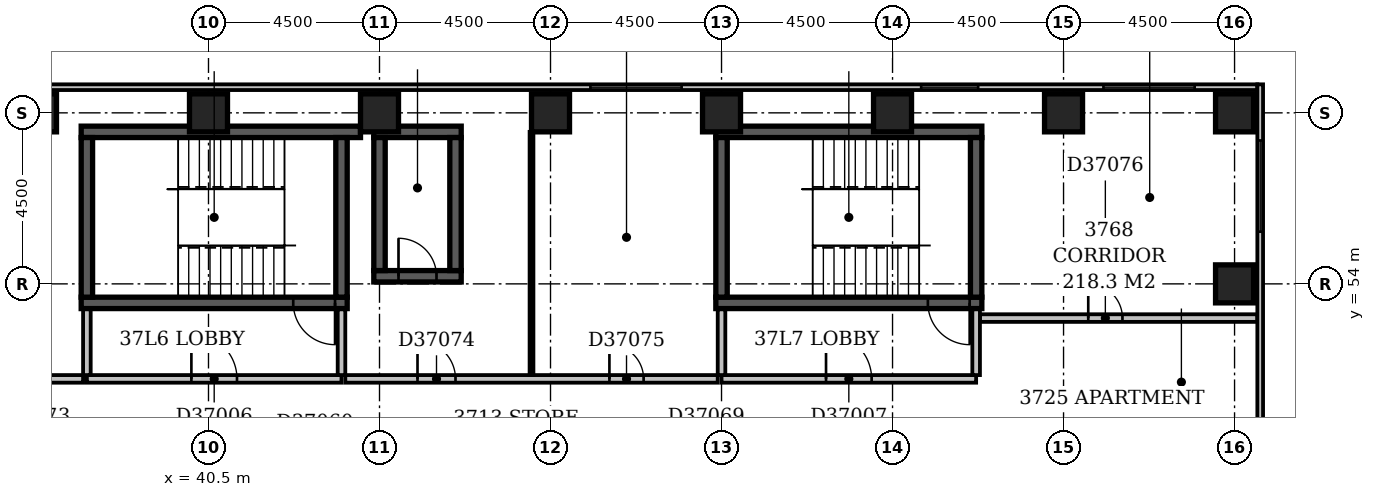
"""IFC4 building model, lengths in metres.
Left out: names, types, materials, properties, quantities, classifications, styles, units other than length and angle.
Written with IfcOpenShell. Run it as: python <this file> out.ifc"""

import sys

from ifc_helpers import new_model, si_unit, direction, frame, frame_2d, origin, origin_2d, place, context, subcontext, project, spatial, rectangle, extrude, element, fill, save


model = new_model("IFC4")
c1 = context("Model", 3, precision=1e-05, world=origin(), true_north=direction((0.0, 1.0)))
c2 = subcontext(c1, "Body", "Model", "MODEL_VIEW")
j1 = project(units=[si_unit("LENGTHUNIT", "METRE"), si_unit("PLANEANGLEUNIT", "RADIAN")], contexts=[c1])
p1 = place(None, origin())
s1 = spatial("IfcSite", under=j1, at=p1, CompositionType="ELEMENT")
p2 = place(p1, origin())
s2 = spatial("IfcBuilding", under=s1, at=p2, CompositionType="ELEMENT")
p3 = place(p2, frame((0.0, 0.0, 148.4)))
s3 = spatial("IfcBuildingStorey", under=s2, at=p3, CompositionType="ELEMENT", Elevation=148.4)
p4 = place(p3, frame((37.15, 53.5, -0.3), z_axis=(0.0, 0.0, 1.0), x_axis=(1.0, 0.0, 0.0)))
e1 = element("IfcWall", 1, at=p4, inside=s3, PredefinedType="SHEAR", context=c2, shape_type="SweptSolid", body=[
    extrude(rectangle(XDim=7.0, YDim=0.3, at=frame_2d((3.5, 0.0))), origin(), (0.0, 0.0, 1.0), 3.6),
])
p5 = place(p4, frame((5.58, 0.0, 0.3)))
e2 = element("IfcOpeningElement", 2, at=p5, cuts=e1, PredefinedType="OPENING", context=c2, shape_type="SweptSolid", body=[
    extrude(rectangle(XDim=1.1, YDim=2.1, at=frame_2d((0.55, 1.05))), frame((0.0, 0.162, 0.0), z_axis=(0.0, -1.0, 0.0), x_axis=(1.0, 0.0, 0.0)), (0.0, 0.0, 1.0), 0.324),
])
p6 = place(p3, frame((37.15, 58.0, -0.3), z_axis=(0.0, 0.0, 1.0), x_axis=(1.0, 0.0, 0.0)))
e3 = element("IfcWall", 3, at=p6, inside=s3, PredefinedType="SHEAR", context=c2, shape_type="SweptSolid", body=[
    extrude(rectangle(XDim=7.35, YDim=0.3, at=frame_2d((3.675, 0.0))), origin(), (0.0, 0.0, 1.0), 3.6),
])
for number, where, z_axis, x_axis in (
    (4, (37.3, 53.65, -0.3), (0.0, 0.0, 1.0), (0.0, 1.0, 0.0)),
    (5, (44.0, 53.65, -0.3), (0.0, 0.0, 1.0), (0.0, 1.0, 0.0)),
):
    element("IfcWall", number, at=place(p3, frame(where, z_axis=z_axis, x_axis=x_axis)), inside=s3, PredefinedType="SHEAR", context=c2, shape_type="SweptSolid", body=[
        extrude(rectangle(XDim=4.2, YDim=0.3, at=frame_2d((2.1, 0.0))), origin(), (0.0, 0.0, 1.0), 3.6),
    ])
p7 = place(p3, frame((44.85, 54.2, -0.3), z_axis=(0.0, 0.0, 1.0), x_axis=(1.0, 0.0, 0.0)))
e6 = element("IfcWall", 6, at=p7, inside=s3, PredefinedType="SHEAR", context=c2, shape_type="SweptSolid", body=[
    extrude(rectangle(XDim=2.3, YDim=0.3, at=frame_2d((1.15, 0.0))), origin(), (0.0, 0.0, 1.0), 3.6),
])
p8 = place(p7, frame((0.65, 0.0, 0.3)))
e7 = element("IfcOpeningElement", 7, at=p8, cuts=e6, PredefinedType="OPENING", context=c2, shape_type="SweptSolid", body=[
    extrude(rectangle(XDim=1.0, YDim=2.1, at=frame_2d((0.5, 1.05))), frame((0.0, 0.162, 0.0), z_axis=(0.0, -1.0, 0.0), x_axis=(1.0, 0.0, 0.0)), (0.0, 0.0, 1.0), 0.324),
])
p9 = place(p3, frame((44.85, 58.0, -0.3), z_axis=(0.0, 0.0, 1.0), x_axis=(1.0, 0.0, 0.0)))
e8 = element("IfcWall", 8, at=p9, inside=s3, PredefinedType="SHEAR", context=c2, shape_type="SweptSolid", body=[
    extrude(rectangle(XDim=2.3, YDim=0.3, at=frame_2d((1.15, 0.0))), origin(), (0.0, 0.0, 1.0), 3.6),
])
for number, where, z_axis, x_axis in (
    (9, (45.0, 54.35, -0.3), (0.0, 0.0, 1.0), (0.0, 1.0, 0.0)),
    (10, (47.0, 54.35, -0.3), (0.0, 0.0, 1.0), (0.0, 1.0, 0.0)),
):
    element("IfcWall", number, at=place(p3, frame(where, z_axis=z_axis, x_axis=x_axis)), inside=s3, PredefinedType="SHEAR", context=c2, shape_type="SweptSolid", body=[
        extrude(rectangle(XDim=3.5, YDim=0.3, at=frame_2d((1.75, 0.0))), origin(), (0.0, 0.0, 1.0), 3.6),
    ])
p10 = place(p3, frame((53.85, 53.5, -0.3), z_axis=(0.0, 0.0, 1.0), x_axis=(1.0, 0.0, 0.0)))
e11 = element("IfcWall", 11, at=p10, inside=s3, PredefinedType="SHEAR", context=c2, shape_type="SweptSolid", body=[
    extrude(rectangle(XDim=7.0, YDim=0.3, at=frame_2d((3.5, 0.0))), origin(), (0.0, 0.0, 1.0), 3.6),
])
p11 = place(p10, frame((5.58, 0.0, 0.3)))
e12 = element("IfcOpeningElement", 12, at=p11, cuts=e11, PredefinedType="OPENING", context=c2, shape_type="SweptSolid", body=[
    extrude(rectangle(XDim=1.1, YDim=2.1, at=frame_2d((0.55, 1.05))), frame((0.0, 0.162, 0.0), z_axis=(0.0, -1.0, 0.0), x_axis=(1.0, 0.0, 0.0)), (0.0, 0.0, 1.0), 0.324),
])
p12 = place(p3, frame((53.85, 58.0, -0.3), z_axis=(0.0, 0.0, 1.0), x_axis=(1.0, 0.0, 0.0)))
e13 = element("IfcWall", 13, at=p12, inside=s3, PredefinedType="SHEAR", context=c2, shape_type="SweptSolid", body=[
    extrude(rectangle(XDim=7.0, YDim=0.3, at=frame_2d((3.5, 0.0))), origin(), (0.0, 0.0, 1.0), 3.6),
])
for number, where, z_axis, x_axis in (
    (14, (54.0, 53.65, -0.3), (0.0, 0.0, 1.0), (0.0, 1.0, 0.0)),
    (15, (60.7, 53.65, -0.3), (0.0, 0.0, 1.0), (0.0, 1.0, 0.0)),
):
    element("IfcWall", number, at=place(p3, frame(where, z_axis=z_axis, x_axis=x_axis)), inside=s3, PredefinedType="SHEAR", context=c2, shape_type="SweptSolid", body=[
        extrude(rectangle(XDim=4.2, YDim=0.3, at=frame_2d((2.1, 0.0))), origin(), (0.0, 0.0, 1.0), 3.6),
    ])
for number, where, z_axis, x_axis in (
    (16, (67.5, 54.0, -0.3), (0.0, 0.0, 1.0), (1.0, 0.0, 0.0)),
    (17, (36.0, 58.5, -0.3), (0.0, 0.0, 1.0), (1.0, 0.0, 0.0)),
    (18, (40.5, 58.5, -0.3), (0.0, 0.0, 1.0), (1.0, 0.0, 0.0)),
    (19, (45.0, 58.5, -0.3), (0.0, 0.0, 1.0), (1.0, 0.0, 0.0)),
    (20, (49.5, 58.5, -0.3), (0.0, 0.0, 1.0), (1.0, 0.0, 0.0)),
    (21, (54.0, 58.5, -0.3), (0.0, 0.0, 1.0), (1.0, 0.0, 0.0)),
    (22, (58.5, 58.5, -0.3), (0.0, 0.0, 1.0), (1.0, 0.0, 0.0)),
    (23, (63.0, 58.5, -0.3), (0.0, 0.0, 1.0), (1.0, 0.0, 0.0)),
    (24, (67.5, 58.5, -0.3), (0.0, 0.0, 1.0), (1.0, 0.0, 0.0)),
):
    element("IfcColumn", number, at=place(p3, frame(where, z_axis=z_axis, x_axis=x_axis)), inside=s3, PredefinedType="COLUMN", context=c2, shape_type="SweptSolid", body=[
        extrude(rectangle(XDim=1.0, YDim=1.0, at=origin_2d()), origin(), (0.0, 0.0, 1.0), 3.6),
    ])
p13 = place(p3, frame((68.175, 35.4, 0.0), z_axis=(0.0, 0.0, 1.0), x_axis=(0.0, 1.0, 0.0)))
e25 = element("IfcWall", 25, at=p13, inside=s3, PredefinedType="STANDARD", context=c2, shape_type="SweptSolid", body=[
    extrude(rectangle(XDim=23.85, YDim=0.15, at=frame_2d((11.925, 0.0))), origin(), (0.0, 0.0, 1.0), 2.7),
])
p14 = place(p13, frame((1.65, 0.0, 0.6)))
e26 = element("IfcOpeningElement", 26, at=p14, cuts=e25, PredefinedType="OPENING", context=c2, shape_type="SweptSolid", body=[
    extrude(rectangle(XDim=2.4, YDim=1.8, at=frame_2d((1.2, 0.9))), frame((0.0, 0.087, 0.0), z_axis=(0.0, -1.0, 0.0), x_axis=(1.0, 0.0, 0.0)), (0.0, 0.0, 1.0), 0.174),
])
p15 = place(p13, frame((10.65, 0.0, 0.6)))
e27 = element("IfcOpeningElement", 27, at=p15, cuts=e25, PredefinedType="OPENING", context=c2, shape_type="SweptSolid", body=[
    extrude(rectangle(XDim=2.4, YDim=1.8, at=frame_2d((1.2, 0.9))), frame((0.0, 0.087, 0.0), z_axis=(0.0, -1.0, 0.0), x_axis=(1.0, 0.0, 0.0)), (0.0, 0.0, 1.0), 0.174),
])
p16 = place(p13, frame((19.973, 0.0, 0.6)))
e28 = element("IfcOpeningElement", 28, at=p16, cuts=e25, PredefinedType="OPENING", context=c2, shape_type="SweptSolid", body=[
    extrude(rectangle(XDim=2.4, YDim=1.8, at=frame_2d((1.2, 0.9))), frame((0.0, 0.087, 0.0), z_axis=(0.0, -1.0, 0.0), x_axis=(1.0, 0.0, 0.0)), (0.0, 0.0, 1.0), 0.174),
])
p17 = place(p3, frame((68.1, 59.175, 0.0), z_axis=(0.0, 0.0, 1.0), x_axis=(-1.0, 0.0, 0.0)))
e29 = element("IfcWall", 29, at=p17, inside=s3, PredefinedType="STANDARD", context=c2, shape_type="SweptSolid", body=[
    extrude(rectangle(XDim=68.85, YDim=0.15, at=frame_2d((34.425, 0.0))), origin(), (0.0, 0.0, 1.0), 2.7),
])
p18 = place(p17, frame((1.65, 0.0, 0.6)))
e30 = element("IfcOpeningElement", 30, at=p18, cuts=e29, PredefinedType="OPENING", context=c2, shape_type="SweptSolid", body=[
    extrude(rectangle(XDim=2.4, YDim=1.8, at=frame_2d((1.2, 0.9))), frame((0.0, 0.087, 0.0), z_axis=(0.0, -1.0, 0.0), x_axis=(1.0, 0.0, 0.0)), (0.0, 0.0, 1.0), 0.174),
])
p19 = place(p17, frame((7.347, 0.0, 0.6)))
e31 = element("IfcOpeningElement", 31, at=p19, cuts=e29, PredefinedType="OPENING", context=c2, shape_type="SweptSolid", body=[
    extrude(rectangle(XDim=1.5, YDim=1.8, at=frame_2d((0.75, 0.9))), frame((0.0, 0.087, 0.0), z_axis=(0.0, -1.0, 0.0), x_axis=(1.0, 0.0, 0.0)), (0.0, 0.0, 1.0), 0.174),
])
p20 = place(p17, frame((15.15, 0.0, 0.6)))
e32 = element("IfcOpeningElement", 32, at=p20, cuts=e29, PredefinedType="OPENING", context=c2, shape_type="SweptSolid", body=[
    extrude(rectangle(XDim=2.4, YDim=1.8, at=frame_2d((1.2, 0.9))), frame((0.0, 0.087, 0.0), z_axis=(0.0, -1.0, 0.0), x_axis=(1.0, 0.0, 0.0)), (0.0, 0.0, 1.0), 0.174),
])
p21 = place(p3, frame((37.3, 51.5, 0.0), z_axis=(0.0, 0.0, 1.0), x_axis=(1.0, 0.0, 0.0)))
e33 = element("IfcWall", 33, at=p21, inside=s3, PredefinedType="PARTITIONING", context=c2, shape_type="SweptSolid", body=[
    extrude(rectangle(XDim=6.7, YDim=0.2, at=frame_2d((3.35, 0.0))), origin(), (0.0, 0.0, 1.0), 3.3),
])
p22 = place(p21, frame((2.75, 0.0, 0.0)))
e34 = element("IfcOpeningElement", 34, at=p22, cuts=e33, PredefinedType="OPENING", context=c2, shape_type="SweptSolid", body=[
    extrude(rectangle(XDim=1.2, YDim=2.1, at=frame_2d((0.6, 1.05))), frame((0.0, 0.112, 0.0), z_axis=(0.0, -1.0, 0.0), x_axis=(1.0, 0.0, 0.0)), (0.0, 0.0, 1.0), 0.224),
])
for number, where, z_axis, x_axis in (
    (35, (44.0, 51.6, 0.0), (0.0, 0.0, 1.0), (0.0, 1.0, 0.0)),
    (36, (37.3, 51.6, 0.0), (0.0, 0.0, 1.0), (0.0, 1.0, 0.0)),
):
    element("IfcWall", number, at=place(p3, frame(where, z_axis=z_axis, x_axis=x_axis)), inside=s3, PredefinedType="PARTITIONING", context=c2, shape_type="SweptSolid", body=[
        extrude(rectangle(XDim=1.73, YDim=0.2, at=frame_2d((0.865, 0.0))), origin(), (0.0, 0.0, 1.0), 3.3),
    ])
p23 = place(p3, frame((54.0, 51.5, 0.0), z_axis=(0.0, 0.0, 1.0), x_axis=(1.0, 0.0, 0.0)))
e37 = element("IfcWall", 37, at=p23, inside=s3, PredefinedType="PARTITIONING", context=c2, shape_type="SweptSolid", body=[
    extrude(rectangle(XDim=6.7, YDim=0.2, at=frame_2d((3.35, 0.0))), origin(), (0.0, 0.0, 1.0), 3.3),
])
p24 = place(p23, frame((2.75, 0.0, 0.0)))
e38 = element("IfcOpeningElement", 38, at=p24, cuts=e37, PredefinedType="OPENING", context=c2, shape_type="SweptSolid", body=[
    extrude(rectangle(XDim=1.2, YDim=2.1, at=frame_2d((0.6, 1.05))), frame((0.0, 0.112, 0.0), z_axis=(0.0, -1.0, 0.0), x_axis=(1.0, 0.0, 0.0)), (0.0, 0.0, 1.0), 0.224),
])
p25 = place(p3, frame((60.7, 51.6, 0.0), z_axis=(0.0, 0.0, 1.0), x_axis=(0.0, 1.0, 0.0)))
e39 = element("IfcWall", 39, at=p25, inside=s3, PredefinedType="PARTITIONING", context=c2, shape_type="SweptSolid", body=[
    extrude(rectangle(XDim=1.73, YDim=0.2, at=frame_2d((0.865, 0.0))), origin(), (0.0, 0.0, 1.0), 3.3),
])
p26 = place(p3, frame((54.0, 51.6, 0.0), z_axis=(0.0, 0.0, 1.0), x_axis=(0.0, 1.0, 0.0)))
e40 = element("IfcWall", 40, at=p26, inside=s3, PredefinedType="PARTITIONING", context=c2, shape_type="SweptSolid", body=[
    extrude(rectangle(XDim=1.73, YDim=0.2, at=frame_2d((0.865, 0.0))), origin(), (0.0, 0.0, 1.0), 2.6),
])
p27 = place(p3, frame((27.9, 51.5, 0.0), z_axis=(0.0, 0.0, 1.0), x_axis=(1.0, 0.0, 0.0)))
e41 = element("IfcWall", 41, at=p27, inside=s3, PredefinedType="PARTITIONING", context=c2, shape_type="SweptSolid", body=[
    extrude(rectangle(XDim=9.3, YDim=0.2, at=frame_2d((4.65, 0.0))), origin(), (0.0, 0.0, 1.0), 3.3),
])
p28 = place(p27, frame((1.5, 0.0, 0.0)))
e42 = element("IfcOpeningElement", 42, at=p28, cuts=e41, PredefinedType="OPENING", context=c2, shape_type="SweptSolid", body=[
    extrude(rectangle(XDim=1.0, YDim=2.1, at=frame_2d((0.5, 1.05))), frame((0.0, 0.112, 0.0), z_axis=(0.0, -1.0, 0.0), x_axis=(1.0, 0.0, 0.0)), (0.0, 0.0, 1.0), 0.224),
])
p29 = place(p27, frame((6.3, 0.0, 0.0)))
e43 = element("IfcOpeningElement", 43, at=p29, cuts=e41, PredefinedType="OPENING", context=c2, shape_type="SweptSolid", body=[
    extrude(rectangle(XDim=0.9, YDim=2.1, at=frame_2d((0.45, 1.05))), frame((0.0, 0.112, 0.0), z_axis=(0.0, -1.0, 0.0), x_axis=(1.0, 0.0, 0.0)), (0.0, 0.0, 1.0), 0.224),
])
p30 = place(p3, frame((44.1, 51.5, 0.0), z_axis=(0.0, 0.0, 1.0), x_axis=(1.0, 0.0, 0.0)))
e44 = element("IfcWall", 44, at=p30, inside=s3, PredefinedType="PARTITIONING", context=c2, shape_type="SweptSolid", body=[
    extrude(rectangle(XDim=9.8, YDim=0.2, at=frame_2d((4.9, 0.0))), origin(), (0.0, 0.0, 1.0), 3.3),
])
p31 = place(p30, frame((1.9, 0.0, 0.0)))
e45 = element("IfcOpeningElement", 45, at=p31, cuts=e44, PredefinedType="OPENING", context=c2, shape_type="SweptSolid", body=[
    extrude(rectangle(XDim=1.0, YDim=2.1, at=frame_2d((0.5, 1.05))), frame((0.0, 0.112, 0.0), z_axis=(0.0, -1.0, 0.0), x_axis=(1.0, 0.0, 0.0)), (0.0, 0.0, 1.0), 0.224),
])
p32 = place(p30, frame((6.95, 0.0, 0.0)))
e46 = element("IfcOpeningElement", 46, at=p32, cuts=e44, PredefinedType="OPENING", context=c2, shape_type="SweptSolid", body=[
    extrude(rectangle(XDim=0.9, YDim=2.1, at=frame_2d((0.45, 1.05))), frame((0.0, 0.112, 0.0), z_axis=(0.0, -1.0, 0.0), x_axis=(1.0, 0.0, 0.0)), (0.0, 0.0, 1.0), 0.224),
])
p33 = place(p3, frame((49.0, 51.6, 0.0), z_axis=(0.0, 0.0, 1.0), x_axis=(0.0, 1.0, 0.0)))
e47 = element("IfcWall", 47, at=p33, inside=s3, PredefinedType="PARTITIONING", context=c2, shape_type="SweptSolid", body=[
    extrude(rectangle(XDim=6.4, YDim=0.1, at=frame_2d((3.2, 0.0))), origin(), (0.0, 0.0, 1.0), 3.3),
])
p34 = place(p3, frame((60.8, 53.1, 0.0), z_axis=(0.0, 0.0, 1.0), x_axis=(1.0, 0.0, 0.0)))
e48 = element("IfcWall", 48, at=p34, inside=s3, PredefinedType="PARTITIONING", context=c2, shape_type="SweptSolid", body=[
    extrude(rectangle(XDim=7.3, YDim=0.2, at=frame_2d((3.65, 0.0))), origin(), (0.0, 0.0, 1.0), 3.3),
])
p35 = place(p34, frame((2.85, 0.0, 0.0)))
e49 = element("IfcOpeningElement", 49, at=p35, cuts=e48, PredefinedType="OPENING", context=c2, shape_type="SweptSolid", body=[
    extrude(rectangle(XDim=0.9, YDim=2.1, at=frame_2d((0.45, 1.05))), frame((0.0, 0.112, 0.0), z_axis=(0.0, -1.0, 0.0), x_axis=(1.0, 0.0, 0.0)), (0.0, 0.0, 1.0), 0.224),
])
p36 = place(p16, origin())
e50 = element("IfcWindow", 50, at=p36, inside=s3, PartitioningType="SINGLE_PANEL", PredefinedType="WINDOW", context=c2, shape_type="SweptSolid", body=[
    extrude(rectangle(XDim=2.4, YDim=1.8, at=frame_2d((1.2, 0.9))), frame((0.0, 0.03, 0.0), z_axis=(0.0, -1.0, 0.0), x_axis=(1.0, 0.0, 0.0)), (0.0, 0.0, 1.0), 0.06),
])
fill(e28, e50)
p37 = place(p18, origin())
e51 = element("IfcWindow", 51, at=p37, inside=s3, PartitioningType="SINGLE_PANEL", PredefinedType="WINDOW", context=c2, shape_type="SweptSolid", body=[
    extrude(rectangle(XDim=2.4, YDim=1.8, at=frame_2d((1.2, 0.9))), frame((0.0, 0.03, 0.0), z_axis=(0.0, -1.0, 0.0), x_axis=(1.0, 0.0, 0.0)), (0.0, 0.0, 1.0), 0.06),
])
fill(e30, e51)
p38 = place(p19, origin())
e52 = element("IfcWindow", 52, at=p38, inside=s3, PartitioningType="SINGLE_PANEL", PredefinedType="WINDOW", context=c2, shape_type="SweptSolid", body=[
    extrude(rectangle(XDim=1.5, YDim=1.8, at=frame_2d((0.75, 0.9))), frame((0.0, 0.03, 0.0), z_axis=(0.0, -1.0, 0.0), x_axis=(1.0, 0.0, 0.0)), (0.0, 0.0, 1.0), 0.06),
])
fill(e31, e52)
p39 = place(p20, origin())
e53 = element("IfcWindow", 53, at=p39, inside=s3, PartitioningType="SINGLE_PANEL", PredefinedType="WINDOW", context=c2, shape_type="SweptSolid", body=[
    extrude(rectangle(XDim=2.4, YDim=1.8, at=frame_2d((1.2, 0.9))), frame((0.0, 0.03, 0.0), z_axis=(0.0, -1.0, 0.0), x_axis=(1.0, 0.0, 0.0)), (0.0, 0.0, 1.0), 0.06),
])
fill(e32, e53)
p40 = place(p22, origin())
e54 = element("IfcDoor", 54, at=p40, inside=s3, OperationType="SINGLE_SWING_LEFT", PredefinedType="DOOR", context=c2, shape_type="SweptSolid", body=[
    extrude(rectangle(XDim=1.2, YDim=2.1, at=frame_2d((0.6, 1.05))), frame((0.0, 0.025, 0.0), z_axis=(0.0, -1.0, 0.0), x_axis=(1.0, 0.0, 0.0)), (0.0, 0.0, 1.0), 0.05),
])
fill(e34, e54)
p41 = place(p24, origin())
e55 = element("IfcDoor", 55, at=p41, inside=s3, OperationType="SINGLE_SWING_LEFT", PredefinedType="DOOR", context=c2, shape_type="SweptSolid", body=[
    extrude(rectangle(XDim=1.2, YDim=2.1, at=frame_2d((0.6, 1.05))), frame((0.0, 0.025, 0.0), z_axis=(0.0, -1.0, 0.0), x_axis=(1.0, 0.0, 0.0)), (0.0, 0.0, 1.0), 0.05),
])
fill(e38, e55)
p42 = place(p8, origin())
e56 = element("IfcDoor", 56, at=p42, inside=s3, OperationType="SINGLE_SWING_LEFT", PredefinedType="DOOR", context=c2, shape_type="SweptSolid", body=[
    extrude(rectangle(XDim=1.0, YDim=2.1, at=frame_2d((0.5, 1.05))), frame((0.0, 0.025, 0.0), z_axis=(0.0, -1.0, 0.0), x_axis=(1.0, 0.0, 0.0)), (0.0, 0.0, 1.0), 0.05),
])
fill(e7, e56)
p43 = place(p5, origin())
e57 = element("IfcDoor", 57, at=p43, inside=s3, OperationType="SINGLE_SWING_RIGHT", PredefinedType="DOOR", context=c2, shape_type="SweptSolid", body=[
    extrude(rectangle(XDim=1.1, YDim=2.1, at=frame_2d((0.55, 1.05))), frame((0.0, 0.025, 0.0), z_axis=(0.0, -1.0, 0.0), x_axis=(1.0, 0.0, 0.0)), (0.0, 0.0, 1.0), 0.05),
])
fill(e2, e57)
p44 = place(p11, origin())
e58 = element("IfcDoor", 58, at=p44, inside=s3, OperationType="SINGLE_SWING_RIGHT", PredefinedType="DOOR", context=c2, shape_type="SweptSolid", body=[
    extrude(rectangle(XDim=1.1, YDim=2.1, at=frame_2d((0.55, 1.05))), frame((0.0, 0.025, 0.0), z_axis=(0.0, -1.0, 0.0), x_axis=(1.0, 0.0, 0.0)), (0.0, 0.0, 1.0), 0.05),
])
fill(e12, e58)
p45 = place(p31, origin())
e59 = element("IfcDoor", 59, at=p45, inside=s3, OperationType="SINGLE_SWING_LEFT", PredefinedType="DOOR", context=c2, shape_type="SweptSolid", body=[
    extrude(rectangle(XDim=1.0, YDim=2.1, at=frame_2d((0.5, 1.05))), frame((0.0, 0.025, 0.0), z_axis=(0.0, -1.0, 0.0), x_axis=(1.0, 0.0, 0.0)), (0.0, 0.0, 1.0), 0.05),
])
fill(e45, e59)
p46 = place(p32, origin())
e60 = element("IfcDoor", 60, at=p46, inside=s3, OperationType="SINGLE_SWING_LEFT", PredefinedType="DOOR", context=c2, shape_type="SweptSolid", body=[
    extrude(rectangle(XDim=0.9, YDim=2.1, at=frame_2d((0.45, 1.05))), frame((0.0, 0.025, 0.0), z_axis=(0.0, -1.0, 0.0), x_axis=(1.0, 0.0, 0.0)), (0.0, 0.0, 1.0), 0.05),
])
fill(e46, e60)
p47 = place(p35, origin())
e61 = element("IfcDoor", 61, at=p47, inside=s3, OperationType="SINGLE_SWING_LEFT", PredefinedType="DOOR", context=c2, shape_type="SweptSolid", body=[
    extrude(rectangle(XDim=0.9, YDim=2.1, at=frame_2d((0.45, 1.05))), frame((0.0, 0.025, 0.0), z_axis=(0.0, -1.0, 0.0), x_axis=(1.0, 0.0, 0.0)), (0.0, 0.0, 1.0), 0.05),
])
fill(e49, e61)
save(model, sys.argv[1])
